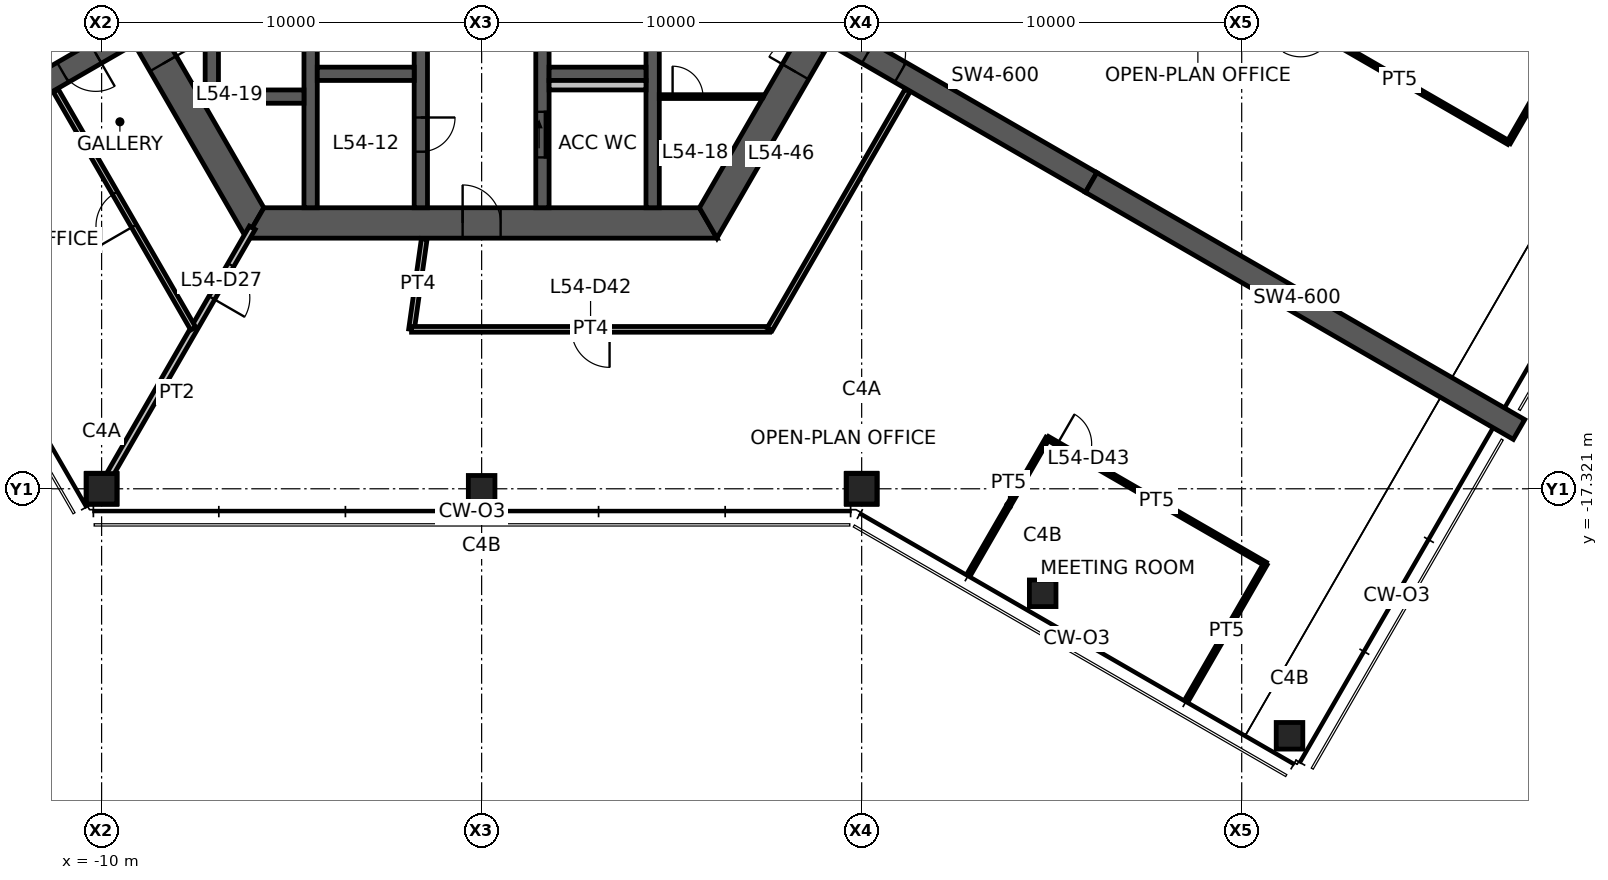
"""IFC4 building model, lengths in metres.
Left out: names, types, materials, properties, quantities, classifications, styles, units other than length and angle.
Written with IfcOpenShell. Run it as: python <this file> out.ifc"""

import sys

from ifc_helpers import new_model, si_unit, direction, frame, frame_2d, origin, origin_2d, place, context, subcontext, project, spatial, polyline, rectangle, hollow_rectangle, outline, extrude, element, fill, save


model = new_model("IFC4")
c1 = context("Model", 3, precision=1e-05, world=origin(), true_north=direction((0.0, 1.0)))
c2 = subcontext(c1, "Body", "Model", "MODEL_VIEW")
j1 = project(units=[si_unit("LENGTHUNIT", "METRE"), si_unit("PLANEANGLEUNIT", "RADIAN")], contexts=[c1])
p1 = place(None, origin())
s1 = spatial("IfcSite", under=j1, at=p1, CompositionType="ELEMENT")
p2 = place(p1, origin())
s2 = spatial("IfcBuilding", under=s1, at=p2, CompositionType="ELEMENT")
p3 = place(p2, frame((0.0, 0.0, 216.7)))
s3 = spatial("IfcBuildingStorey", under=s2, at=p3, CompositionType="ELEMENT", Elevation=216.7)
for number, where, z_axis, x_axis in (
    (1, (-10.0, -17.321, 0.0), (0.0, 0.0, 1.0), (1.0, 0.0, 0.0)),
    (2, (10.0, -17.321, 0.0), (0.0, 0.0, 1.0), (1.0, 0.0, 0.0)),
):
    element("IfcColumn", number, at=place(p3, frame(where, z_axis=z_axis, x_axis=x_axis)), inside=s3, PredefinedType="COLUMN", context=c2, shape_type="SweptSolid", body=[
        extrude(hollow_rectangle(XDim=0.8, YDim=0.8, WallThickness=0.04, at=origin_2d()), origin(), (0.0, 0.0, 1.0), 3.9),
    ])
for number, where, z_axis, x_axis in (
    (3, (0.0, -17.321, 0.0), (0.0, 0.0, 1.0), (1.0, 0.0, 0.0)),
    (4, (14.763, -20.071, 0.0), (0.0, 0.0, 1.0), (1.0, 0.0, 0.0)),
    (5, (21.258, -23.821, 0.0), (0.0, 0.0, 1.0), (1.0, 0.0, 0.0)),
):
    element("IfcColumn", number, at=place(p3, frame(where, z_axis=z_axis, x_axis=x_axis)), inside=s3, PredefinedType="COLUMN", context=c2, shape_type="SweptSolid", body=[
        extrude(hollow_rectangle(XDim=0.7, YDim=0.7, WallThickness=0.032, at=origin_2d()), origin(), (0.0, 0.0, 1.0), 3.9),
    ])
p4 = place(p3, frame((-11.922, 0.0, 0.0), z_axis=(0.0, 0.0, 1.0), x_axis=(0.500004296715, -0.866022923061, 0.0)))
e6 = element("IfcWall", 6, at=p4, inside=s3, PredefinedType="SHEAR", context=c2, shape_type="SweptSolid", body=[
    extrude(outline(polyline([(-0.231, -0.4), (6.281, -0.4), (7.081, -0.4), (12.153, -0.4), (11.691, 0.4), (7.081, 0.4), (6.281, 0.4), (0.231, 0.4), (-0.231, -0.4)])), origin(), (0.0, 0.0, 1.0), 3.9),
])
p5 = place(p4, frame((6.281, 0.0, 0.0)))
e7 = element("IfcOpeningElement", 7, at=p5, cuts=e6, PredefinedType="OPENING", context=c2, shape_type="SweptSolid", body=[
    extrude(rectangle(XDim=0.8, YDim=2.1, at=frame_2d((0.4, 1.05))), frame((0.0, 0.41, 0.0), z_axis=(0.0, -1.0, 0.0), x_axis=(1.0, 0.0, 0.0)), (0.0, 0.0, 1.0), 0.82),
])
p6 = place(p3, frame((-5.961, -10.325, 0.0), z_axis=(0.0, 0.0, 1.0), x_axis=(1.0, 0.0, 0.0)))
e8 = element("IfcWall", 8, at=p6, inside=s3, PredefinedType="SHEAR", context=c2, shape_type="SweptSolid", body=[
    extrude(outline(polyline([(-0.231, -0.4), (5.461, -0.4), (6.461, -0.4), (12.153, -0.4), (11.691, 0.4), (6.461, 0.4), (5.461, 0.4), (0.231, 0.4), (-0.231, -0.4)])), origin(), (0.0, 0.0, 1.0), 3.9),
])
p7 = place(p6, frame((5.461, 0.0, 0.0)))
e9 = element("IfcOpeningElement", 9, at=p7, cuts=e8, PredefinedType="OPENING", context=c2, shape_type="SweptSolid", body=[
    extrude(rectangle(XDim=1.0, YDim=2.1, at=frame_2d((0.5, 1.05))), frame((0.0, 0.41, 0.0), z_axis=(0.0, -1.0, 0.0), x_axis=(1.0, 0.0, 0.0)), (0.0, 0.0, 1.0), 0.82),
])
p8 = place(p3, frame((5.961, -10.325, 0.0), z_axis=(0.0, 0.0, 1.0), x_axis=(0.500004296715, 0.866022923061, 0.0)))
e10 = element("IfcWall", 10, at=p8, inside=s3, PredefinedType="SHEAR", context=c2, shape_type="SweptSolid", body=[
    extrude(outline(polyline([(-0.231, -0.4), (4.594, -0.4), (5.394, -0.4), (12.153, -0.4), (11.691, 0.4), (5.394, 0.4), (4.594, 0.4), (0.231, 0.4), (-0.231, -0.4)])), origin(), (0.0, 0.0, 1.0), 3.9),
])
p9 = place(p8, frame((4.594, 0.0, 0.0)))
e11 = element("IfcOpeningElement", 11, at=p9, cuts=e10, PredefinedType="OPENING", context=c2, shape_type="SweptSolid", body=[
    extrude(rectangle(XDim=0.8, YDim=2.1, at=frame_2d((0.4, 1.05))), frame((0.0, 0.41, 0.0), z_axis=(0.0, -1.0, 0.0), x_axis=(1.0, 0.0, 0.0)), (0.0, 0.0, 1.0), 0.82),
])
p10 = place(p3, frame((-9.288, -5.363, 0.0), z_axis=(0.0, 0.0, 1.0), x_axis=(-0.866027473358, -0.499996415376, 0.0)))
e12 = element("IfcWall", 12, at=p10, inside=s3, PredefinedType="SHEAR", context=c2, shape_type="SweptSolid", body=[
    extrude(rectangle(XDim=7.045, YDim=0.6, at=frame_2d((3.523, 0.0))), origin(), (0.0, 0.0, 1.0), 3.9),
])
p11 = place(p10, frame((1.0, 0.0, 0.0)))
e13 = element("IfcOpeningElement", 13, at=p11, cuts=e12, PredefinedType="OPENING", context=c2, shape_type="SweptSolid", body=[
    extrude(rectangle(XDim=1.0, YDim=2.1, at=frame_2d((0.5, 1.05))), frame((0.0, 0.31, 0.0), z_axis=(0.0, -1.0, 0.0), x_axis=(1.0, 0.0, 0.0)), (0.0, 0.0, 1.0), 0.62),
])
p12 = place(p3, frame((9.288, -5.363, 0.0), z_axis=(0.0, 0.0, 1.0), x_axis=(0.866031736626, -0.499989031036, 0.0)))
e14 = element("IfcWall", 14, at=p12, inside=s3, PredefinedType="SHEAR", context=c2, shape_type="SweptSolid", body=[
    extrude(rectangle(XDim=7.796, YDim=0.6, at=frame_2d((3.898, 0.0))), origin(), (0.0, 0.0, 1.0), 3.9),
])
p13 = place(p12, frame((1.0, 0.0, 0.0)))
e15 = element("IfcOpeningElement", 15, at=p13, cuts=e14, PredefinedType="OPENING", context=c2, shape_type="SweptSolid", body=[
    extrude(rectangle(XDim=1.0, YDim=2.1, at=frame_2d((0.5, 1.05))), frame((0.0, 0.31, 0.0), z_axis=(0.0, -1.0, 0.0), x_axis=(1.0, 0.0, 0.0)), (0.0, 0.0, 1.0), 0.62),
])
p14 = place(p3, frame((16.039, -9.26, 0.0), z_axis=(0.0, 0.0, 1.0), x_axis=(0.866024837091, -0.50000098154, 0.0)))
e16 = element("IfcWall", 16, at=p14, inside=s3, PredefinedType="SHEAR", context=c2, shape_type="SweptSolid", body=[
    extrude(rectangle(XDim=13.0, YDim=0.6, at=frame_2d((6.5, 0.0))), origin(), (0.0, 0.0, 1.0), 3.9),
])
p15 = place(p3, frame((-1.6, -3.775, 0.0), z_axis=(0.0, 0.0, 1.0), x_axis=(0.0, -1.0, 0.0)))
e17 = element("IfcWall", 17, at=p15, inside=s3, PredefinedType="SHEAR", context=c2, shape_type="SweptSolid", body=[
    extrude(rectangle(XDim=6.15, YDim=0.35, at=frame_2d((3.075, 0.0))), origin(), (0.0, 0.0, 1.0), 3.9),
])
p16 = place(p15, frame((3.775, 0.0, 0.0)))
e18 = element("IfcOpeningElement", 18, at=p16, cuts=e17, PredefinedType="OPENING", context=c2, shape_type="SweptSolid", body=[
    extrude(rectangle(XDim=0.9, YDim=2.1, at=frame_2d((0.45, 1.05))), frame((0.0, 0.185, 0.0), z_axis=(0.0, -1.0, 0.0), x_axis=(1.0, 0.0, 0.0)), (0.0, 0.0, 1.0), 0.37),
])
p17 = place(p3, frame((1.6, -3.775, 0.0), z_axis=(0.0, 0.0, 1.0), x_axis=(0.0, -1.0, 0.0)))
e19 = element("IfcWall", 19, at=p17, inside=s3, PredefinedType="SHEAR", context=c2, shape_type="SweptSolid", body=[
    extrude(rectangle(XDim=6.15, YDim=0.35, at=frame_2d((3.075, 0.0))), origin(), (0.0, 0.0, 1.0), 3.9),
])
p18 = place(p17, frame((3.625, 0.0, 0.0)))
e20 = element("IfcOpeningElement", 20, at=p18, cuts=e19, PredefinedType="OPENING", context=c2, shape_type="SweptSolid", body=[
    extrude(rectangle(XDim=1.2, YDim=2.1, at=frame_2d((0.6, 1.05))), frame((0.0, 0.185, 0.0), z_axis=(0.0, -1.0, 0.0), x_axis=(1.0, 0.0, 0.0)), (0.0, 0.0, 1.0), 0.37),
])
for number, where, z_axis, x_axis in (
    (21, (-4.5, -3.775, 0.0), (0.0, 0.0, 1.0), (0.0, -1.0, 0.0)),
    (22, (4.5, -3.775, 0.0), (0.0, 0.0, 1.0), (0.0, -1.0, 0.0)),
):
    element("IfcWall", number, at=place(p3, frame(where, z_axis=z_axis, x_axis=x_axis)), inside=s3, PredefinedType="SHEAR", context=c2, shape_type="SweptSolid", body=[
        extrude(rectangle(XDim=6.15, YDim=0.35, at=frame_2d((3.075, 0.0))), origin(), (0.0, 0.0, 1.0), 3.9),
    ])
for number, where, z_axis, x_axis in (
    (23, (-4.325, -6.4, 0.0), (0.0, 0.0, 1.0), (1.0, 0.0, 0.0)),
    (24, (1.775, -6.4, 0.0), (0.0, 0.0, 1.0), (1.0, 0.0, 0.0)),
):
    element("IfcWall", number, at=place(p3, frame(where, z_axis=z_axis, x_axis=x_axis)), inside=s3, PredefinedType="SHEAR", context=c2, shape_type="SweptSolid", body=[
        extrude(rectangle(XDim=2.55, YDim=0.35, at=frame_2d((1.275, 0.0))), origin(), (0.0, 0.0, 1.0), 3.9),
    ])
p19 = place(p3, frame((-7.275, -7.0, 0.0), z_axis=(0.0, 0.0, 1.0), x_axis=(1.0, 0.0, 0.0)))
e25 = element("IfcWall", 25, at=p19, inside=s3, PredefinedType="SHEAR", context=c2, shape_type="SweptSolid", body=[
    extrude(rectangle(XDim=2.6, YDim=0.35, at=frame_2d((1.3, 0.0))), origin(), (0.0, 0.0, 1.0), 3.9),
])
p20 = place(p3, frame((-7.1, -3.775, 0.0), z_axis=(0.0, 0.0, 1.0), x_axis=(0.0, -1.0, 0.0)))
e26 = element("IfcWall", 26, at=p20, inside=s3, PredefinedType="SHEAR", context=c2, shape_type="SweptSolid", body=[
    extrude(rectangle(XDim=3.05, YDim=0.35, at=frame_2d((1.525, 0.0))), origin(), (0.0, 0.0, 1.0), 3.9),
])
p21 = place(p3, frame((1.775, -6.7, 0.0), z_axis=(0.0, 0.0, 1.0), x_axis=(1.0, 0.0, 0.0)))
e27 = element("IfcWall", 27, at=p21, inside=s3, PredefinedType="PLUMBINGWALL", context=c2, shape_type="SweptSolid", body=[
    extrude(rectangle(XDim=2.55, YDim=0.25, at=frame_2d((1.275, 0.0))), origin(), (0.0, 0.0, 1.0), 3.9),
])
p22 = place(p3, frame((4.675, -7.0, 0.0), z_axis=(0.0, 0.0, 1.0), x_axis=(1.0, 0.0, 0.0)))
e28 = element("IfcWall", 28, at=p22, inside=s3, PredefinedType="PARTITIONING", context=c2, shape_type="SweptSolid", body=[
    extrude(outline(polyline([(0.0, -0.05), (0.35, -0.05), (1.15, -0.05), (2.715, -0.05), (2.744, 0.0), (2.75, 0.05), (1.15, 0.05), (0.35, 0.05), (0.0, 0.05), (0.0, -0.05)])), origin(), (0.0, 0.0, 1.0), 2.95),
])
p23 = place(p22, frame((0.35, 0.0, 0.0)))
e29 = element("IfcOpeningElement", 29, at=p23, cuts=e28, PredefinedType="OPENING", context=c2, shape_type="SweptSolid", body=[
    extrude(rectangle(XDim=0.8, YDim=2.1, at=frame_2d((0.4, 1.05))), frame((0.0, 0.06, 0.0), z_axis=(0.0, -1.0, 0.0), x_axis=(1.0, 0.0, 0.0)), (0.0, 0.0, 1.0), 0.12),
])
p24 = place(p3, frame((-6.035, -10.453, 0.0), z_axis=(0.0, 0.0, 1.0), x_axis=(-0.499989830942, -0.866031274813, 0.0)))
e30 = element("IfcWall", 30, at=p24, inside=s3, PredefinedType="PARTITIONING", context=c2, shape_type="SweptSolid", body=[
    extrude(rectangle(XDim=7.93, YDim=0.175, at=frame_2d((3.965, 0.0))), origin(), (0.0, 0.0, 1.0), 3.05),
])
p25 = place(p24, frame((1.13, 0.0, 0.0)))
e31 = element("IfcOpeningElement", 31, at=p25, cuts=e30, PredefinedType="OPENING", context=c2, shape_type="SweptSolid", body=[
    extrude(rectangle(XDim=1.0, YDim=2.1, at=frame_2d((0.5, 1.05))), frame((0.0, 0.098, 0.0), z_axis=(0.0, -1.0, 0.0), x_axis=(1.0, 0.0, 0.0)), (0.0, 0.0, 1.0), 0.195),
])
p26 = place(p3, frame((-7.589, -13.105, 0.0), z_axis=(0.0, 0.0, 1.0), x_axis=(-0.499986333712, 0.866033293876, 0.0)))
e32 = element("IfcWall", 32, at=p26, inside=s3, PredefinedType="PARTITIONING", context=c2, shape_type="SweptSolid", body=[
    extrude(rectangle(XDim=7.235, YDim=0.15, at=frame_2d((3.617, 0.0))), origin(), (0.0, 0.0, 1.0), 2.95),
])
p27 = place(p26, frame((3.117, 0.0, 0.0)))
e33 = element("IfcOpeningElement", 33, at=p27, cuts=e32, PredefinedType="OPENING", context=c2, shape_type="SweptSolid", body=[
    extrude(rectangle(XDim=1.0, YDim=2.1, at=frame_2d((0.5, 1.05))), frame((0.0, 0.085, 0.0), z_axis=(0.0, -1.0, 0.0), x_axis=(1.0, 0.0, 0.0)), (0.0, 0.0, 1.0), 0.17),
])
p28 = place(p3, frame((27.025, -8.213, 0.0), z_axis=(0.0, 0.0, 1.0), x_axis=(-0.866021597574, 0.500006592492, 0.0)))
e34 = element("IfcWall", 34, at=p28, inside=s3, PredefinedType="PARTITIONING", context=c2, shape_type="SweptSolid", body=[
    extrude(rectangle(XDim=6.62, YDim=0.1, at=frame_2d((3.31, 0.0))), origin(), (0.0, 0.0, 1.0), 2.95),
])
p29 = place(p28, frame((5.42, 0.0, 0.0)))
e35 = element("IfcOpeningElement", 35, at=p29, cuts=e34, PredefinedType="OPENING", context=c2, shape_type="SweptSolid", body=[
    extrude(rectangle(XDim=0.9, YDim=2.1, at=frame_2d((0.45, 1.05))), frame((0.0, 0.06, 0.0), z_axis=(0.0, -1.0, 0.0), x_axis=(1.0, 0.0, 0.0)), (0.0, 0.0, 1.0), 0.12),
])
p30 = place(p3, frame((29.08, -4.653, 0.0), z_axis=(0.0, 0.0, 1.0), x_axis=(-0.500010383074, -0.866019409031, 0.0)))
e36 = element("IfcWall", 36, at=p30, inside=s3, PredefinedType="PARTITIONING", context=c2, shape_type="SweptSolid", body=[
    extrude(rectangle(XDim=4.11, YDim=0.1, at=frame_2d((2.055, 0.0))), origin(), (0.0, 0.0, 1.0), 2.95),
])
p31 = place(p3, frame((-1.844, -13.125, 0.0), z_axis=(0.0, 0.0, 1.0), x_axis=(0.139173892267, 0.99026795753, 0.0)))
e37 = element("IfcWall", 37, at=p31, inside=s3, PredefinedType="PARTITIONING", context=c2, shape_type="SweptSolid", body=[
    extrude(rectangle(XDim=2.403, YDim=0.15, at=frame_2d((1.202, 0.0))), origin(), (0.0, 0.0, 1.0), 2.95),
])
p32 = place(p3, frame((7.578, -13.125, 0.0), z_axis=(0.0, 0.0, 1.0), x_axis=(-1.0, 0.0, 0.0)))
e38 = element("IfcWall", 38, at=p32, inside=s3, PredefinedType="PARTITIONING", context=c2, shape_type="SweptSolid", body=[
    extrude(rectangle(XDim=9.422, YDim=0.15, at=frame_2d((4.711, 0.0))), origin(), (0.0, 0.0, 1.0), 2.95),
])
p33 = place(p32, frame((4.211, 0.0, 0.0)))
e39 = element("IfcOpeningElement", 39, at=p33, cuts=e38, PredefinedType="OPENING", context=c2, shape_type="SweptSolid", body=[
    extrude(rectangle(XDim=1.0, YDim=2.1, at=frame_2d((0.5, 1.05))), frame((0.0, 0.085, 0.0), z_axis=(0.0, -1.0, 0.0), x_axis=(1.0, 0.0, 0.0)), (0.0, 0.0, 1.0), 0.17),
])
p34 = place(p3, frame((11.207, -6.84, 0.0), z_axis=(0.0, 0.0, 1.0), x_axis=(-0.500002959843, -0.866023694911, 0.0)))
e40 = element("IfcWall", 40, at=p34, inside=s3, PredefinedType="PARTITIONING", context=c2, shape_type="SweptSolid", body=[
    extrude(rectangle(XDim=7.258, YDim=0.15, at=frame_2d((3.629, 0.0))), origin(), (0.0, 0.0, 1.0), 2.95),
])
p35 = place(p3, frame((12.837, -19.548, 0.0), z_axis=(0.0, 0.0, 1.0), x_axis=(0.499965833383, 0.866045128991, 0.0)))
e41 = element("IfcWall", 41, at=p35, inside=s3, PredefinedType="PARTITIONING", context=c2, shape_type="SweptSolid", body=[
    extrude(rectangle(XDim=4.11, YDim=0.1, at=frame_2d((2.055, 0.0))), origin(), (0.0, 0.0, 1.0), 2.95),
])
p36 = place(p3, frame((14.892, -15.988, 0.0), z_axis=(0.0, 0.0, 1.0), x_axis=(0.866030817826, -0.499990622488, 0.0)))
e42 = element("IfcWall", 42, at=p36, inside=s3, PredefinedType="PARTITIONING", context=c2, shape_type="SweptSolid", body=[
    extrude(rectangle(XDim=6.62, YDim=0.1, at=frame_2d((3.31, 0.0))), origin(), (0.0, 0.0, 1.0), 2.95),
])
p37 = place(p36, frame((0.3, 0.0, 0.0)))
e43 = element("IfcOpeningElement", 43, at=p37, cuts=e42, PredefinedType="OPENING", context=c2, shape_type="SweptSolid", body=[
    extrude(rectangle(XDim=0.9, YDim=2.1, at=frame_2d((0.45, 1.05))), frame((0.0, 0.06, 0.0), z_axis=(0.0, -1.0, 0.0), x_axis=(1.0, 0.0, 0.0)), (0.0, 0.0, 1.0), 0.12),
])
p38 = place(p3, frame((20.625, -19.298, 0.0), z_axis=(0.0, 0.0, 1.0), x_axis=(-0.500000428765, -0.866025156237, 0.0)))
e44 = element("IfcWall", 44, at=p38, inside=s3, PredefinedType="PARTITIONING", context=c2, shape_type="SweptSolid", body=[
    extrude(rectangle(XDim=4.08, YDim=0.1, at=frame_2d((2.04, 0.0))), origin(), (0.0, 0.0, 1.0), 2.95),
])
p39 = place(p7, origin())
e45 = element("IfcDoor", 45, at=p39, inside=s3, OperationType="SINGLE_SWING_LEFT", PredefinedType="DOOR", context=c2, shape_type="SweptSolid", body=[
    extrude(rectangle(XDim=1.0, YDim=2.1, at=frame_2d((0.5, 1.05))), frame((0.0, 0.025, 0.0), z_axis=(0.0, -1.0, 0.0), x_axis=(1.0, 0.0, 0.0)), (0.0, 0.0, 1.0), 0.05),
])
fill(e9, e45)
p40 = place(p9, origin())
e46 = element("IfcDoor", 46, at=p40, inside=s3, OperationType="SINGLE_SWING_LEFT", PredefinedType="DOOR", context=c2, shape_type="SweptSolid", body=[
    extrude(rectangle(XDim=0.8, YDim=2.1, at=frame_2d((0.4, 1.05))), frame((0.0, 0.025, 0.0), z_axis=(0.0, -1.0, 0.0), x_axis=(1.0, 0.0, 0.0)), (0.0, 0.0, 1.0), 0.05),
])
fill(e11, e46)
p41 = place(p5, origin())
e47 = element("IfcDoor", 47, at=p41, inside=s3, OperationType="SINGLE_SWING_RIGHT", PredefinedType="DOOR", context=c2, shape_type="SweptSolid", body=[
    extrude(rectangle(XDim=0.8, YDim=2.1, at=frame_2d((0.4, 1.05))), frame((0.0, 0.025, 0.0), z_axis=(0.0, -1.0, 0.0), x_axis=(1.0, 0.0, 0.0)), (0.0, 0.0, 1.0), 0.05),
])
fill(e7, e47)
p42 = place(p18, origin())
e48 = element("IfcDoor", 48, at=p42, inside=s3, OperationType="SLIDING_TO_LEFT", PredefinedType="DOOR", context=c2, shape_type="SweptSolid", body=[
    extrude(rectangle(XDim=1.2, YDim=2.1, at=frame_2d((0.6, 1.05))), frame((0.0, 0.025, 0.0), z_axis=(0.0, -1.0, 0.0), x_axis=(1.0, 0.0, 0.0)), (0.0, 0.0, 1.0), 0.05),
])
fill(e20, e48)
p43 = place(p16, origin())
e49 = element("IfcDoor", 49, at=p43, inside=s3, OperationType="SINGLE_SWING_LEFT", PredefinedType="DOOR", context=c2, shape_type="SweptSolid", body=[
    extrude(rectangle(XDim=0.9, YDim=2.1, at=frame_2d((0.45, 1.05))), frame((0.0, 0.025, 0.0), z_axis=(0.0, -1.0, 0.0), x_axis=(1.0, 0.0, 0.0)), (0.0, 0.0, 1.0), 0.05),
])
fill(e18, e49)
p44 = place(p11, origin())
e50 = element("IfcDoor", 50, at=p44, inside=s3, OperationType="SINGLE_SWING_LEFT", PredefinedType="DOOR", context=c2, shape_type="SweptSolid", body=[
    extrude(rectangle(XDim=1.0, YDim=2.1, at=frame_2d((0.5, 1.05))), frame((0.0, 0.025, 0.0), z_axis=(0.0, -1.0, 0.0), x_axis=(1.0, 0.0, 0.0)), (0.0, 0.0, 1.0), 0.05),
])
fill(e13, e50)
p45 = place(p13, origin())
e51 = element("IfcDoor", 51, at=p45, inside=s3, OperationType="SINGLE_SWING_LEFT", PredefinedType="DOOR", context=c2, shape_type="SweptSolid", body=[
    extrude(rectangle(XDim=1.0, YDim=2.1, at=frame_2d((0.5, 1.05))), frame((0.0, 0.025, 0.0), z_axis=(0.0, -1.0, 0.0), x_axis=(1.0, 0.0, 0.0)), (0.0, 0.0, 1.0), 0.05),
])
fill(e15, e51)
p46 = place(p23, origin())
e52 = element("IfcDoor", 52, at=p46, inside=s3, OperationType="SINGLE_SWING_LEFT", PredefinedType="DOOR", context=c2, shape_type="SweptSolid", body=[
    extrude(rectangle(XDim=0.8, YDim=2.1, at=frame_2d((0.4, 1.05))), frame((0.0, 0.025, 0.0), z_axis=(0.0, -1.0, 0.0), x_axis=(1.0, 0.0, 0.0)), (0.0, 0.0, 1.0), 0.05),
])
fill(e29, e52)
p47 = place(p25, origin())
e53 = element("IfcDoor", 53, at=p47, inside=s3, OperationType="SINGLE_SWING_RIGHT", PredefinedType="DOOR", context=c2, shape_type="SweptSolid", body=[
    extrude(rectangle(XDim=1.0, YDim=2.1, at=frame_2d((0.5, 1.05))), frame((0.0, 0.025, 0.0), z_axis=(0.0, -1.0, 0.0), x_axis=(1.0, 0.0, 0.0)), (0.0, 0.0, 1.0), 0.05),
])
fill(e31, e53)
p48 = place(p27, origin())
e54 = element("IfcDoor", 54, at=p48, inside=s3, OperationType="SINGLE_SWING_LEFT", PredefinedType="DOOR", context=c2, shape_type="SweptSolid", body=[
    extrude(rectangle(XDim=1.0, YDim=2.1, at=frame_2d((0.5, 1.05))), frame((0.0, 0.025, 0.0), z_axis=(0.0, -1.0, 0.0), x_axis=(1.0, 0.0, 0.0)), (0.0, 0.0, 1.0), 0.05),
])
fill(e33, e54)
p49 = place(p33, origin())
e55 = element("IfcDoor", 55, at=p49, inside=s3, OperationType="SINGLE_SWING_LEFT", PredefinedType="DOOR", context=c2, shape_type="SweptSolid", body=[
    extrude(rectangle(XDim=1.0, YDim=2.1, at=frame_2d((0.5, 1.05))), frame((0.0, 0.025, 0.0), z_axis=(0.0, -1.0, 0.0), x_axis=(1.0, 0.0, 0.0)), (0.0, 0.0, 1.0), 0.05),
])
fill(e39, e55)
p50 = place(p37, origin())
e56 = element("IfcDoor", 56, at=p50, inside=s3, OperationType="SINGLE_SWING_LEFT", PredefinedType="DOOR", context=c2, shape_type="SweptSolid", body=[
    extrude(rectangle(XDim=0.9, YDim=2.1, at=frame_2d((0.45, 1.05))), frame((0.0, 0.025, 0.0), z_axis=(0.0, -1.0, 0.0), x_axis=(1.0, 0.0, 0.0)), (0.0, 0.0, 1.0), 0.05),
])
fill(e43, e56)
save(model, sys.argv[1])
